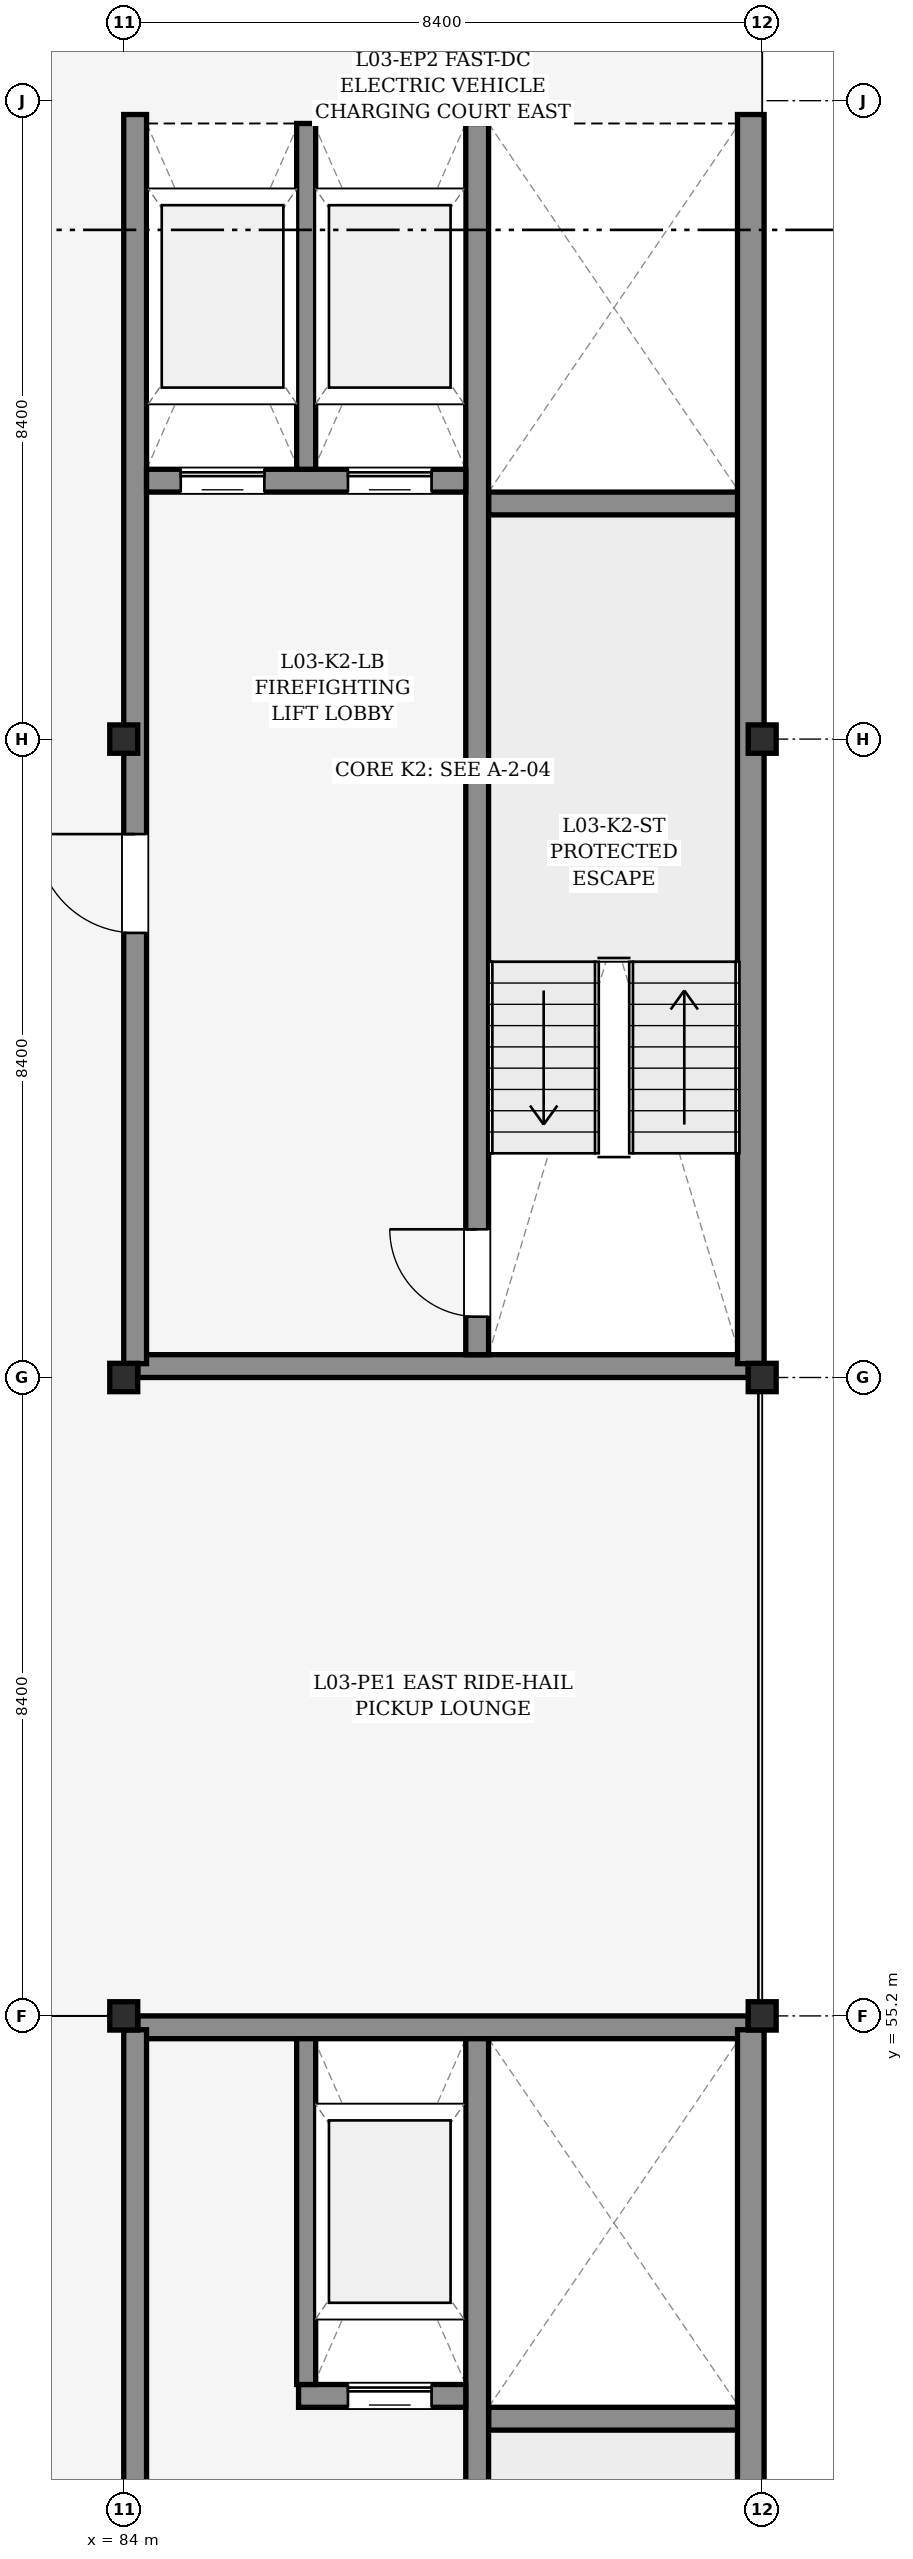
"""IFC4 building model, lengths in metres.
Left out: names, types, materials, properties, quantities, classifications, styles, units other than length and angle.
Written with IfcOpenShell. Run it as: python <this file> out.ifc"""

import sys

from ifc_helpers import new_model, si_unit, direction, frame, frame_2d, origin, origin_2d, place, context, subcontext, project, spatial, rectangle, i_section, extrude, element, fill, save


model = new_model("IFC4")
c1 = context("Model", 3, precision=1e-05, world=origin(), true_north=direction((0.0, 1.0)))
c2 = subcontext(c1, "Body", "Model", "MODEL_VIEW")
j1 = project(units=[si_unit("LENGTHUNIT", "METRE"), si_unit("PLANEANGLEUNIT", "RADIAN")], contexts=[c1])
p1 = place(None, origin())
s1 = spatial("IfcSite", under=j1, at=p1, CompositionType="ELEMENT")
p2 = place(p1, origin())
s2 = spatial("IfcBuilding", under=s1, at=p2, CompositionType="ELEMENT")
p3 = place(p2, frame((0.0, 0.0, 12.6)))
s3 = spatial("IfcBuildingStorey", under=s2, at=p3, CompositionType="ELEMENT", Elevation=12.6)
for number, where, z_axis, x_axis in (
    (1, (84.0, 55.2, 0.0), (0.0, 0.0, 1.0), (1.0, 0.0, 0.0)),
    (2, (84.0, 63.6, 0.0), (0.0, 0.0, 1.0), (1.0, 0.0, 0.0)),
    (3, (84.0, 72.0, 0.0), (0.0, 0.0, 1.0), (1.0, 0.0, 0.0)),
    (4, (84.0, 80.4, 0.0), (0.0, 0.0, 1.0), (1.0, 0.0, 0.0)),
    (5, (92.4, 55.2, 0.0), (0.0, 0.0, 1.0), (1.0, 0.0, 0.0)),
    (6, (92.4, 63.6, 0.0), (0.0, 0.0, 1.0), (1.0, 0.0, 0.0)),
    (7, (92.4, 72.0, 0.0), (0.0, 0.0, 1.0), (1.0, 0.0, 0.0)),
    (8, (92.4, 80.4, 0.0), (0.0, 0.0, 1.0), (1.0, 0.0, 0.0)),
):
    element("IfcColumn", number, at=place(p3, frame(where, z_axis=z_axis, x_axis=x_axis)), inside=s3, PredefinedType="COLUMN", context=c2, shape_type="SweptSolid", body=[
        extrude(i_section(OverallWidth=0.373, OverallDepth=0.368, WebThickness=0.014, FlangeThickness=0.024, FilletRadius=0.015, at=origin_2d()), origin(), (0.0, 0.0, 1.0), 3.6),
    ])
for number, where, z_axis, x_axis in (
    (9, (84.185, 63.75, 0.0), (0.0, 0.0, 1.0), (1.0, 0.0, 0.0)),
    (10, (84.185, 80.25, 0.0), (0.0, 0.0, 1.0), (1.0, 0.0, 0.0)),
):
    element("IfcWall", number, at=place(p3, frame(where, z_axis=z_axis, x_axis=x_axis)), inside=s3, PredefinedType="SHEAR", context=c2, shape_type="SweptSolid", body=[
        extrude(rectangle(XDim=8.031, YDim=0.3, at=frame_2d((4.016, 0.0))), origin(), (0.0, 0.0, 1.0), 3.38),
    ])
p4 = place(p3, frame((88.8, 75.1, 0.0), z_axis=(0.0, 0.0, 1.0), x_axis=(1.0, 0.0, 0.0)))
e11 = element("IfcWall", 11, at=p4, inside=s3, PredefinedType="SHEAR", context=c2, shape_type="SweptSolid", body=[
    extrude(rectangle(XDim=3.3, YDim=0.3, at=frame_2d((1.65, 0.0))), origin(), (0.0, 0.0, 1.0), 3.38),
])
p5 = place(p3, frame((92.25, 63.782, 0.0), z_axis=(0.0, 0.0, 1.0), x_axis=(0.0, 1.0, 0.0)))
e12 = element("IfcWall", 12, at=p5, inside=s3, PredefinedType="SHEAR", context=c2, shape_type="SweptSolid", body=[
    extrude(rectangle(XDim=16.436, YDim=0.35, at=frame_2d((8.218, 0.0))), origin(), (0.0, 0.0, 1.0), 3.38),
])
p6 = place(p3, frame((84.15, 63.782, 0.0), z_axis=(0.0, 0.0, 1.0), x_axis=(0.0, 1.0, 0.0)))
e13 = element("IfcWall", 13, at=p6, inside=s3, PredefinedType="SHEAR", context=c2, shape_type="SweptSolid", body=[
    extrude(rectangle(XDim=16.436, YDim=0.3, at=frame_2d((8.218, 0.0))), origin(), (0.0, 0.0, 1.0), 3.38),
])
p7 = place(p6, frame((5.668, 0.0, 0.0)))
e14 = element("IfcOpeningElement", 14, at=p7, cuts=e13, PredefinedType="OPENING", context=c2, shape_type="SweptSolid", body=[
    extrude(rectangle(XDim=1.3, YDim=2.2, at=frame_2d((0.65, 1.1))), frame((0.0, 0.16, 0.0), z_axis=(0.0, -1.0, 0.0), x_axis=(1.0, 0.0, 0.0)), (0.0, 0.0, 1.0), 0.32),
])
p8 = place(p3, frame((88.65, 63.9, 0.0), z_axis=(0.0, 0.0, 1.0), x_axis=(0.0, 1.0, 0.0)))
e15 = element("IfcWall", 15, at=p8, inside=s3, PredefinedType="SHEAR", context=c2, shape_type="SweptSolid", body=[
    extrude(rectangle(XDim=16.2, YDim=0.3, at=frame_2d((8.1, 0.0))), origin(), (0.0, 0.0, 1.0), 3.38),
])
p9 = place(p8, frame((0.5, 0.0, 0.0)))
e16 = element("IfcOpeningElement", 16, at=p9, cuts=e15, PredefinedType="OPENING", context=c2, shape_type="SweptSolid", body=[
    extrude(rectangle(XDim=1.15, YDim=2.15, at=frame_2d((0.575, 1.075))), frame((0.0, 0.16, 0.0), z_axis=(0.0, -1.0, 0.0), x_axis=(1.0, 0.0, 0.0)), (0.0, 0.0, 1.0), 0.32),
])
p10 = place(p3, frame((84.3, 75.4, 0.0), z_axis=(0.0, 0.0, 1.0), x_axis=(1.0, 0.0, 0.0)))
e17 = element("IfcWall", 17, at=p10, inside=s3, PredefinedType="SHEAR", context=c2, shape_type="SweptSolid", body=[
    extrude(rectangle(XDim=4.2, YDim=0.3, at=frame_2d((2.1, 0.0))), origin(), (0.0, 0.0, 1.0), 3.38),
])
p11 = place(p10, frame((0.45, 0.0, 0.0)))
e18 = element("IfcOpeningElement", 18, at=p11, cuts=e17, PredefinedType="OPENING", context=c2, shape_type="SweptSolid", body=[
    extrude(rectangle(XDim=1.1, YDim=2.2, at=frame_2d((0.55, 1.1))), frame((0.0, 0.16, 0.0), z_axis=(0.0, -1.0, 0.0), x_axis=(1.0, 0.0, 0.0)), (0.0, 0.0, 1.0), 0.32),
])
p12 = place(p10, frame((2.65, 0.0, 0.0)))
e19 = element("IfcOpeningElement", 19, at=p12, cuts=e17, PredefinedType="OPENING", context=c2, shape_type="SweptSolid", body=[
    extrude(rectangle(XDim=1.1, YDim=2.2, at=frame_2d((0.55, 1.1))), frame((0.0, 0.16, 0.0), z_axis=(0.0, -1.0, 0.0), x_axis=(1.0, 0.0, 0.0)), (0.0, 0.0, 1.0), 0.32),
])
p13 = place(p3, frame((86.4, 75.55, 0.0), z_axis=(0.0, 0.0, 1.0), x_axis=(0.0, 1.0, 0.0)))
e20 = element("IfcWall", 20, at=p13, inside=s3, PredefinedType="PARTITIONING", context=c2, shape_type="SweptSolid", body=[
    extrude(rectangle(XDim=4.55, YDim=0.25, at=frame_2d((2.275, 0.0))), origin(), (0.0, 0.0, 1.0), 2.525),
])
p14 = place(p3, frame((84.185, 55.05, 0.0), z_axis=(0.0, 0.0, 1.0), x_axis=(1.0, 0.0, 0.0)))
e21 = element("IfcWall", 21, at=p14, inside=s3, PredefinedType="SHEAR", context=c2, shape_type="SweptSolid", body=[
    extrude(rectangle(XDim=8.031, YDim=0.3, at=frame_2d((4.016, 0.0))), origin(), (0.0, 0.0, 1.0), 3.38),
])
p15 = place(p3, frame((88.8, 49.9, 0.0), z_axis=(0.0, 0.0, 1.0), x_axis=(1.0, 0.0, 0.0)))
e22 = element("IfcWall", 22, at=p15, inside=s3, PredefinedType="SHEAR", context=c2, shape_type="SweptSolid", body=[
    extrude(rectangle(XDim=3.3, YDim=0.3, at=frame_2d((1.65, 0.0))), origin(), (0.0, 0.0, 1.0), 3.38),
])
p16 = place(p3, frame((92.25, 38.582, 0.0), z_axis=(0.0, 0.0, 1.0), x_axis=(0.0, 1.0, 0.0)))
e23 = element("IfcWall", 23, at=p16, inside=s3, PredefinedType="SHEAR", context=c2, shape_type="SweptSolid", body=[
    extrude(rectangle(XDim=16.436, YDim=0.35, at=frame_2d((8.218, 0.0))), origin(), (0.0, 0.0, 1.0), 3.38),
])
p17 = place(p3, frame((84.15, 38.582, 0.0), z_axis=(0.0, 0.0, 1.0), x_axis=(0.0, 1.0, 0.0)))
e24 = element("IfcWall", 24, at=p17, inside=s3, PredefinedType="SHEAR", context=c2, shape_type="SweptSolid", body=[
    extrude(rectangle(XDim=16.436, YDim=0.3, at=frame_2d((8.218, 0.0))), origin(), (0.0, 0.0, 1.0), 3.38),
])
p18 = place(p17, frame((5.668, 0.0, 0.0)))
e25 = element("IfcOpeningElement", 25, at=p18, cuts=e24, PredefinedType="OPENING", context=c2, shape_type="SweptSolid", body=[
    extrude(rectangle(XDim=1.25, YDim=2.15, at=frame_2d((0.625, 1.075))), frame((0.0, 0.16, 0.0), z_axis=(0.0, -1.0, 0.0), x_axis=(1.0, 0.0, 0.0)), (0.0, 0.0, 1.0), 0.32),
])
p19 = place(p3, frame((88.65, 38.7, 0.0), z_axis=(0.0, 0.0, 1.0), x_axis=(0.0, 1.0, 0.0)))
e26 = element("IfcWall", 26, at=p19, inside=s3, PredefinedType="SHEAR", context=c2, shape_type="SweptSolid", body=[
    extrude(rectangle(XDim=16.2, YDim=0.3, at=frame_2d((8.1, 0.0))), origin(), (0.0, 0.0, 1.0), 3.38),
])
p20 = place(p19, frame((0.5, 0.0, 0.0)))
e27 = element("IfcOpeningElement", 27, at=p20, cuts=e26, PredefinedType="OPENING", context=c2, shape_type="SweptSolid", body=[
    extrude(rectangle(XDim=1.15, YDim=2.15, at=frame_2d((0.575, 1.075))), frame((0.0, 0.16, 0.0), z_axis=(0.0, -1.0, 0.0), x_axis=(1.0, 0.0, 0.0)), (0.0, 0.0, 1.0), 0.32),
])
p21 = place(p3, frame((86.3, 50.2, 0.0), z_axis=(0.0, 0.0, 1.0), x_axis=(1.0, 0.0, 0.0)))
e28 = element("IfcWall", 28, at=p21, inside=s3, PredefinedType="SHEAR", context=c2, shape_type="SweptSolid", body=[
    extrude(rectangle(XDim=2.2, YDim=0.3, at=frame_2d((1.1, 0.0))), origin(), (0.0, 0.0, 1.0), 3.38),
])
p22 = place(p21, frame((0.65, 0.0, 0.0)))
e29 = element("IfcOpeningElement", 29, at=p22, cuts=e28, PredefinedType="OPENING", context=c2, shape_type="SweptSolid", body=[
    extrude(rectangle(XDim=1.1, YDim=2.2, at=frame_2d((0.55, 1.1))), frame((0.0, 0.16, 0.0), z_axis=(0.0, -1.0, 0.0), x_axis=(1.0, 0.0, 0.0)), (0.0, 0.0, 1.0), 0.32),
])
p23 = place(p3, frame((86.4, 50.35, 0.0), z_axis=(0.0, 0.0, 1.0), x_axis=(0.0, 1.0, 0.0)))
e30 = element("IfcWall", 30, at=p23, inside=s3, PredefinedType="PARTITIONING", context=c2, shape_type="SweptSolid", body=[
    extrude(rectangle(XDim=4.55, YDim=0.25, at=frame_2d((2.275, 0.0))), origin(), (0.0, 0.0, 1.0), 2.525),
])
p24 = place(p7, origin())
e31 = element("IfcDoor", 31, at=p24, inside=s3, OperationType="SINGLE_SWING_RIGHT", PredefinedType="DOOR", context=c2, shape_type="SweptSolid", body=[
    extrude(rectangle(XDim=1.3, YDim=2.2, at=frame_2d((0.65, 1.1))), frame((0.0, 0.025, 0.0), z_axis=(0.0, -1.0, 0.0), x_axis=(1.0, 0.0, 0.0)), (0.0, 0.0, 1.0), 0.05),
])
fill(e14, e31)
p25 = place(p9, origin())
e32 = element("IfcDoor", 32, at=p25, inside=s3, OperationType="SINGLE_SWING_RIGHT", PredefinedType="DOOR", context=c2, shape_type="SweptSolid", body=[
    extrude(rectangle(XDim=1.15, YDim=2.15, at=frame_2d((0.575, 1.075))), frame((0.0, 0.025, 0.0), z_axis=(0.0, -1.0, 0.0), x_axis=(1.0, 0.0, 0.0)), (0.0, 0.0, 1.0), 0.05),
])
fill(e16, e32)
p26 = place(p11, origin())
e33 = element("IfcDoor", 33, at=p26, inside=s3, OperationType="SLIDING_TO_LEFT", PredefinedType="DOOR", context=c2, shape_type="SweptSolid", body=[
    extrude(rectangle(XDim=1.1, YDim=2.2, at=frame_2d((0.55, 1.1))), frame((0.0, 0.025, 0.0), z_axis=(0.0, -1.0, 0.0), x_axis=(1.0, 0.0, 0.0)), (0.0, 0.0, 1.0), 0.05),
])
fill(e18, e33)
p27 = place(p12, origin())
e34 = element("IfcDoor", 34, at=p27, inside=s3, OperationType="SLIDING_TO_LEFT", PredefinedType="DOOR", context=c2, shape_type="SweptSolid", body=[
    extrude(rectangle(XDim=1.1, YDim=2.2, at=frame_2d((0.55, 1.1))), frame((0.0, 0.025, 0.0), z_axis=(0.0, -1.0, 0.0), x_axis=(1.0, 0.0, 0.0)), (0.0, 0.0, 1.0), 0.05),
])
fill(e19, e34)
p28 = place(p22, origin())
e35 = element("IfcDoor", 35, at=p28, inside=s3, OperationType="SLIDING_TO_LEFT", PredefinedType="DOOR", context=c2, shape_type="SweptSolid", body=[
    extrude(rectangle(XDim=1.1, YDim=2.2, at=frame_2d((0.55, 1.1))), frame((0.0, 0.025, 0.0), z_axis=(0.0, -1.0, 0.0), x_axis=(1.0, 0.0, 0.0)), (0.0, 0.0, 1.0), 0.05),
])
fill(e29, e35)
save(model, sys.argv[1])
